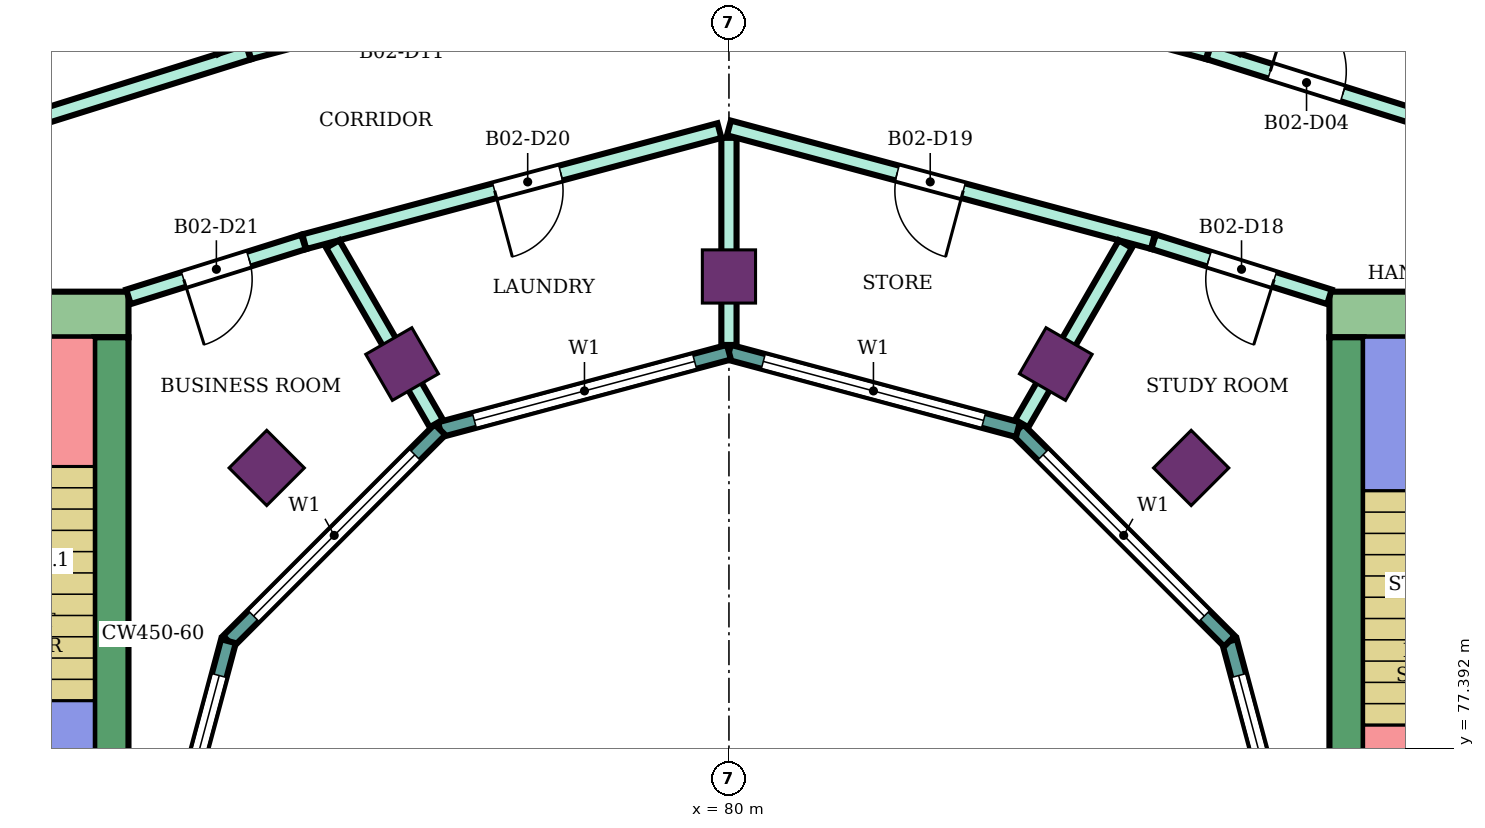
"""IFC4 building model, lengths in metres.
Left out: names, types, materials, properties, quantities, classifications, styles, units other than length and angle.
Written with IfcOpenShell. Run it as: python <this file> out.ifc"""

import sys

from ifc_helpers import new_model, si_unit, direction, frame, frame_2d, origin, origin_2d, place, context, subcontext, project, spatial, rectangle, extrude, element, fill, save


model = new_model("IFC4")
c1 = context("Model", 3, precision=1e-05, world=origin(), true_north=direction((0.0, 1.0)))
c2 = subcontext(c1, "Body", "Model", "MODEL_VIEW")
j1 = project(units=[si_unit("LENGTHUNIT", "METRE"), si_unit("PLANEANGLEUNIT", "RADIAN")], contexts=[c1])
p1 = place(None, origin())
s1 = spatial("IfcSite", under=j1, at=p1, CompositionType="ELEMENT")
p2 = place(p1, origin())
s2 = spatial("IfcBuilding", under=s1, at=p2, CompositionType="ELEMENT")
p3 = place(p2, frame((0.0, 0.0, 220.9)))
s3 = spatial("IfcBuildingStorey", under=s2, at=p3, CompositionType="ELEMENT", Elevation=220.9)
for number, where, z_axis, x_axis in (
    (1, (86.081, 81.081, 0.0), (0.0, 0.0, 1.0), (0.707, 0.707, 0.0)),
    (2, (84.3, 82.448, 0.0), (0.0, 0.0, 1.0), (0.5, 0.866, 0.0)),
    (3, (80.0, 83.6, 0.0), (0.0, 0.0, 1.0), (0.0, 1.0, 0.0)),
    (4, (75.7, 82.448, 0.0), (0.0, 0.0, 1.0), (-0.5, 0.866, 0.0)),
    (5, (73.919, 81.081, 0.0), (0.0, 0.0, 1.0), (-0.707, 0.707, 0.0)),
):
    element("IfcColumn", number, at=place(p3, frame(where, z_axis=z_axis, x_axis=x_axis)), inside=s3, PredefinedType="COLUMN", context=c2, shape_type="SweptSolid", body=[
        extrude(rectangle(XDim=0.7, YDim=0.7, at=origin_2d()), origin(), (0.0, 0.0, 1.0), 4.2),
    ])
p4 = place(p3, frame((87.9, 83.1, 0.0), z_axis=(0.0, 0.0, 1.0), x_axis=(1.0, 0.0, 0.0)))
e6 = element("IfcWall", 6, at=p4, inside=s3, PredefinedType="SHEAR", context=c2, shape_type="SweptSolid", body=[
    extrude(rectangle(XDim=14.9, YDim=0.6, at=frame_2d((7.45, 0.0))), origin(), (0.0, 0.0, 1.0), 3.88),
])
p5 = place(p4, frame((4.2, 0.0, 0.0)))
e7 = element("IfcOpeningElement", 7, at=p5, cuts=e6, PredefinedType="OPENING", context=c2, shape_type="SweptSolid", body=[
    extrude(rectangle(XDim=2.4, YDim=2.4, at=frame_2d((1.2, 1.2))), frame((0.0, 0.31, 0.0), z_axis=(0.0, -1.0, 0.0), x_axis=(1.0, 0.0, 0.0)), (0.0, 0.0, 1.0), 0.62),
])
p6 = place(p3, frame((88.125, 75.0, 0.0), z_axis=(0.0, 0.0, 1.0), x_axis=(0.0, 1.0, 0.0)))
e8 = element("IfcWall", 8, at=p6, inside=s3, PredefinedType="SHEAR", context=c2, shape_type="SweptSolid", body=[
    extrude(rectangle(XDim=7.8, YDim=0.45, at=frame_2d((3.9, 0.0))), origin(), (0.0, 0.0, 1.0), 3.88),
])
p7 = place(p3, frame((72.1, 83.1, 0.0), z_axis=(0.0, 0.0, 1.0), x_axis=(-1.0, 0.0, 0.0)))
e9 = element("IfcWall", 9, at=p7, inside=s3, PredefinedType="SHEAR", context=c2, shape_type="SweptSolid", body=[
    extrude(rectangle(XDim=14.9, YDim=0.6, at=frame_2d((7.45, 0.0))), origin(), (0.0, 0.0, 1.0), 3.88),
])
p8 = place(p7, frame((4.2, 0.0, 0.0)))
e10 = element("IfcOpeningElement", 10, at=p8, cuts=e9, PredefinedType="OPENING", context=c2, shape_type="SweptSolid", body=[
    extrude(rectangle(XDim=2.4, YDim=2.4, at=frame_2d((1.2, 1.2))), frame((0.0, 0.31, 0.0), z_axis=(0.0, -1.0, 0.0), x_axis=(1.0, 0.0, 0.0)), (0.0, 0.0, 1.0), 0.62),
])
p9 = place(p3, frame((71.875, 82.8, 0.0), z_axis=(0.0, 0.0, 1.0), x_axis=(0.0, -1.0, 0.0)))
e11 = element("IfcWall", 11, at=p9, inside=s3, PredefinedType="SHEAR", context=c2, shape_type="SweptSolid", body=[
    extrude(rectangle(XDim=7.8, YDim=0.45, at=frame_2d((3.9, 0.0))), origin(), (0.0, 0.0, 1.0), 3.88),
])
p10 = place(p3, frame((87.604, 75.0, 0.0), z_axis=(0.0, 0.0, 1.0), x_axis=(-0.258789828301, 0.965933654434, 0.0)))
e12 = element("IfcWall", 12, at=p10, inside=s3, PredefinedType="NOTDEFINED", context=c2, shape_type="SweptSolid", body=[
    extrude(rectangle(XDim=3.936, YDim=0.2, at=frame_2d((1.968, 0.0))), origin(), (0.0, 0.0, 1.0), 4.2),
])
p11 = place(p10, frame((0.468, 0.0, 0.9)))
e13 = element("IfcOpeningElement", 13, at=p11, cuts=e12, PredefinedType="OPENING", context=c2, shape_type="SweptSolid", body=[
    extrude(rectangle(XDim=3.0, YDim=2.3, at=frame_2d((1.5, 1.15))), frame((0.0, 0.11, 0.0), z_axis=(0.0, -1.0, 0.0), x_axis=(1.0, 0.0, 0.0)), (0.0, 0.0, 1.0), 0.22),
])
p12 = place(p3, frame((86.585, 78.802, 0.0), z_axis=(0.0, 0.0, 1.0), x_axis=(-0.707106781187, 0.707106781187, 0.0)))
e14 = element("IfcWall", 14, at=p12, inside=s3, PredefinedType="NOTDEFINED", context=c2, shape_type="SweptSolid", body=[
    extrude(rectangle(XDim=3.936, YDim=0.2, at=frame_2d((1.968, 0.0))), origin(), (0.0, 0.0, 1.0), 4.2),
])
p13 = place(p12, frame((0.468, 0.0, 0.9)))
e15 = element("IfcOpeningElement", 15, at=p13, cuts=e14, PredefinedType="OPENING", context=c2, shape_type="SweptSolid", body=[
    extrude(rectangle(XDim=3.0, YDim=2.3, at=frame_2d((1.5, 1.15))), frame((0.0, 0.11, 0.0), z_axis=(0.0, -1.0, 0.0), x_axis=(1.0, 0.0, 0.0)), (0.0, 0.0, 1.0), 0.22),
])
p14 = place(p3, frame((83.802, 81.585, 0.0), z_axis=(0.0, 0.0, 1.0), x_axis=(-0.965933654434, 0.258789828301, 0.0)))
e16 = element("IfcWall", 16, at=p14, inside=s3, PredefinedType="NOTDEFINED", context=c2, shape_type="SweptSolid", body=[
    extrude(rectangle(XDim=3.936, YDim=0.2, at=frame_2d((1.968, 0.0))), origin(), (0.0, 0.0, 1.0), 4.2),
])
p15 = place(p14, frame((0.468, 0.0, 0.9)))
e17 = element("IfcOpeningElement", 17, at=p15, cuts=e16, PredefinedType="OPENING", context=c2, shape_type="SweptSolid", body=[
    extrude(rectangle(XDim=3.0, YDim=2.3, at=frame_2d((1.5, 1.15))), frame((0.0, 0.11, 0.0), z_axis=(0.0, -1.0, 0.0), x_axis=(1.0, 0.0, 0.0)), (0.0, 0.0, 1.0), 0.22),
])
p16 = place(p3, frame((80.0, 82.604, 0.0), z_axis=(0.0, 0.0, 1.0), x_axis=(-0.965933654434, -0.258789828301, 0.0)))
e18 = element("IfcWall", 18, at=p16, inside=s3, PredefinedType="NOTDEFINED", context=c2, shape_type="SweptSolid", body=[
    extrude(rectangle(XDim=3.936, YDim=0.2, at=frame_2d((1.968, 0.0))), origin(), (0.0, 0.0, 1.0), 4.2),
])
p17 = place(p16, frame((0.468, 0.0, 0.9)))
e19 = element("IfcOpeningElement", 19, at=p17, cuts=e18, PredefinedType="OPENING", context=c2, shape_type="SweptSolid", body=[
    extrude(rectangle(XDim=3.0, YDim=2.3, at=frame_2d((1.5, 1.15))), frame((0.0, 0.11, 0.0), z_axis=(0.0, -1.0, 0.0), x_axis=(1.0, 0.0, 0.0)), (0.0, 0.0, 1.0), 0.22),
])
p18 = place(p3, frame((76.198, 81.585, 0.0), z_axis=(0.0, 0.0, 1.0), x_axis=(-0.707106781187, -0.707106781187, 0.0)))
e20 = element("IfcWall", 20, at=p18, inside=s3, PredefinedType="NOTDEFINED", context=c2, shape_type="SweptSolid", body=[
    extrude(rectangle(XDim=3.936, YDim=0.2, at=frame_2d((1.968, 0.0))), origin(), (0.0, 0.0, 1.0), 4.2),
])
p19 = place(p18, frame((0.468, 0.0, 0.9)))
e21 = element("IfcOpeningElement", 21, at=p19, cuts=e20, PredefinedType="OPENING", context=c2, shape_type="SweptSolid", body=[
    extrude(rectangle(XDim=3.0, YDim=2.3, at=frame_2d((1.5, 1.15))), frame((0.0, 0.11, 0.0), z_axis=(0.0, -1.0, 0.0), x_axis=(1.0, 0.0, 0.0)), (0.0, 0.0, 1.0), 0.22),
])
p20 = place(p3, frame((73.415, 78.802, 0.0), z_axis=(0.0, 0.0, 1.0), x_axis=(-0.258789828301, -0.965933654434, 0.0)))
e22 = element("IfcWall", 22, at=p20, inside=s3, PredefinedType="NOTDEFINED", context=c2, shape_type="SweptSolid", body=[
    extrude(rectangle(XDim=3.936, YDim=0.2, at=frame_2d((1.968, 0.0))), origin(), (0.0, 0.0, 1.0), 4.2),
])
p21 = place(p20, frame((0.468, 0.0, 0.9)))
e23 = element("IfcOpeningElement", 23, at=p21, cuts=e22, PredefinedType="OPENING", context=c2, shape_type="SweptSolid", body=[
    extrude(rectangle(XDim=3.0, YDim=2.3, at=frame_2d((1.5, 1.15))), frame((0.0, 0.11, 0.0), z_axis=(0.0, -1.0, 0.0), x_axis=(1.0, 0.0, 0.0)), (0.0, 0.0, 1.0), 0.22),
])
p22 = place(p3, frame((68.2, 84.834, 0.0), z_axis=(0.0, 0.0, 1.0), x_axis=(0.954260265251, 0.298977166624, 0.0)))
e24 = element("IfcWall", 24, at=p22, inside=s3, PredefinedType="PARTITIONING", context=c2, shape_type="SweptSolid", body=[
    extrude(rectangle(XDim=5.741, YDim=0.2, at=frame_2d((2.87, 0.0))), origin(), (0.0, 0.0, 1.0), 3.75),
])
p23 = place(p3, frame((72.1, 83.332, 0.0), z_axis=(0.0, 0.0, 1.0), x_axis=(0.954233106619, 0.299063836383, 0.0)))
e25 = element("IfcWall", 25, at=p23, inside=s3, PredefinedType="PARTITIONING", context=c2, shape_type="SweptSolid", body=[
    extrude(rectangle(XDim=2.414, YDim=0.2, at=frame_2d((1.207, 0.0))), origin(), (0.0, 0.0, 1.0), 3.75),
])
p24 = place(p23, frame((0.762, 0.0, 0.0)))
e26 = element("IfcOpeningElement", 26, at=p24, cuts=e25, PredefinedType="OPENING", context=c2, shape_type="SweptSolid", body=[
    extrude(rectangle(XDim=0.9, YDim=2.1, at=frame_2d((0.45, 1.05))), frame((0.0, 0.11, 0.0), z_axis=(0.0, -1.0, 0.0), x_axis=(1.0, 0.0, 0.0)), (0.0, 0.0, 1.0), 0.22),
])
p25 = place(p3, frame((73.687, 86.554, 0.0), z_axis=(0.0, 0.0, 1.0), x_axis=(0.96595258731, 0.258719150952, 0.0)))
e27 = element("IfcWall", 27, at=p25, inside=s3, PredefinedType="PARTITIONING", context=c2, shape_type="SweptSolid", body=[
    extrude(rectangle(XDim=6.486, YDim=0.2, at=frame_2d((3.243, 0.0))), origin(), (0.0, 0.0, 1.0), 3.75),
])
p26 = place(p25, frame((1.578, 0.0, 0.0)))
e28 = element("IfcOpeningElement", 28, at=p26, cuts=e27, PredefinedType="OPENING", context=c2, shape_type="SweptSolid", body=[
    extrude(rectangle(XDim=1.0, YDim=2.1, at=frame_2d((0.5, 1.05))), frame((0.0, 0.11, 0.0), z_axis=(0.0, -1.0, 0.0), x_axis=(1.0, 0.0, 0.0)), (0.0, 0.0, 1.0), 0.22),
])
p27 = place(p3, frame((74.413, 84.057, 0.0), z_axis=(0.0, 0.0, 1.0), x_axis=(0.965972135939, 0.258646153246, 0.0)))
e29 = element("IfcWall", 29, at=p27, inside=s3, PredefinedType="PARTITIONING", context=c2, shape_type="SweptSolid", body=[
    extrude(rectangle(XDim=5.654, YDim=0.2, at=frame_2d((2.827, 0.0))), origin(), (0.0, 0.0, 1.0), 3.75),
])
p28 = place(p27, frame((2.593, 0.0, 0.0)))
e30 = element("IfcOpeningElement", 30, at=p28, cuts=e29, PredefinedType="OPENING", context=c2, shape_type="SweptSolid", body=[
    extrude(rectangle(XDim=0.9, YDim=2.1, at=frame_2d((0.45, 1.05))), frame((0.0, 0.11, 0.0), z_axis=(0.0, -1.0, 0.0), x_axis=(1.0, 0.0, 0.0)), (0.0, 0.0, 1.0), 0.22),
])
p29 = place(p3, frame((74.787, 84.027, 0.0), z_axis=(0.0, 0.0, 1.0), x_axis=(0.500079107518, -0.86597972622, 0.0)))
e31 = element("IfcWall", 31, at=p29, inside=s3, PredefinedType="PARTITIONING", context=c2, shape_type="SweptSolid", body=[
    extrude(rectangle(XDim=2.726, YDim=0.2, at=frame_2d((1.363, 0.0))), origin(), (0.0, 0.0, 1.0), 3.75),
])
p30 = place(p3, frame((80.0, 82.699, 0.0), z_axis=(0.0, 0.0, 1.0), x_axis=(0.0, 1.0, 0.0)))
e32 = element("IfcWall", 32, at=p30, inside=s3, PredefinedType="PARTITIONING", context=c2, shape_type="SweptSolid", body=[
    extrude(rectangle(XDim=2.725, YDim=0.2, at=frame_2d((1.363, 0.0))), origin(), (0.0, 0.0, 1.0), 3.75),
])
p31 = place(p3, frame((80.0, 85.554, 0.0), z_axis=(0.0, 0.0, 1.0), x_axis=(0.965928989968, -0.258807237802, 0.0)))
e33 = element("IfcWall", 33, at=p31, inside=s3, PredefinedType="PARTITIONING", context=c2, shape_type="SweptSolid", body=[
    extrude(rectangle(XDim=5.774, YDim=0.2, at=frame_2d((2.887, 0.0))), origin(), (0.0, 0.0, 1.0), 3.75),
])
p32 = place(p31, frame((2.292, 0.0, 0.0)))
e34 = element("IfcOpeningElement", 34, at=p32, cuts=e33, PredefinedType="OPENING", context=c2, shape_type="SweptSolid", body=[
    extrude(rectangle(XDim=0.9, YDim=2.1, at=frame_2d((0.45, 1.05))), frame((0.0, 0.11, 0.0), z_axis=(0.0, -1.0, 0.0), x_axis=(1.0, 0.0, 0.0)), (0.0, 0.0, 1.0), 0.22),
])
p33 = place(p3, frame((80.048, 88.233, 0.0), z_axis=(0.0, 0.0, 1.0), x_axis=(0.965865387308, -0.259044501198, 0.0)))
e35 = element("IfcWall", 35, at=p33, inside=s3, PredefinedType="PARTITIONING", context=c2, shape_type="SweptSolid", body=[
    extrude(rectangle(XDim=6.476, YDim=0.2, at=frame_2d((3.238, 0.0))), origin(), (0.0, 0.0, 1.0), 3.75),
])
p34 = place(p33, frame((0.5, 0.0, 0.0)))
e36 = element("IfcOpeningElement", 36, at=p34, cuts=e35, PredefinedType="OPENING", context=c2, shape_type="SweptSolid", body=[
    extrude(rectangle(XDim=1.0, YDim=2.1, at=frame_2d((0.5, 1.05))), frame((0.0, 0.11, 0.0), z_axis=(0.0, -1.0, 0.0), x_axis=(1.0, 0.0, 0.0)), (0.0, 0.0, 1.0), 0.22),
])
p35 = place(p3, frame((83.852, 81.665, 0.0), z_axis=(0.0, 0.0, 1.0), x_axis=(0.500146274735, 0.865940935554, 0.0)))
e37 = element("IfcWall", 37, at=p35, inside=s3, PredefinedType="PARTITIONING", context=c2, shape_type="SweptSolid", body=[
    extrude(rectangle(XDim=2.726, YDim=0.2, at=frame_2d((1.363, 0.0))), origin(), (0.0, 0.0, 1.0), 3.75),
])
p36 = place(p3, frame((85.587, 84.057, 0.0), z_axis=(0.0, 0.0, 1.0), x_axis=(0.954239513179, -0.299043393987, 0.0)))
e38 = element("IfcWall", 38, at=p36, inside=s3, PredefinedType="PARTITIONING", context=c2, shape_type="SweptSolid", body=[
    extrude(rectangle(XDim=2.424, YDim=0.2, at=frame_2d((1.212, 0.0))), origin(), (0.0, 0.0, 1.0), 3.75),
])
p37 = place(p36, frame((0.762, 0.0, 0.0)))
e39 = element("IfcOpeningElement", 39, at=p37, cuts=e38, PredefinedType="OPENING", context=c2, shape_type="SweptSolid", body=[
    extrude(rectangle(XDim=0.9, YDim=2.1, at=frame_2d((0.45, 1.05))), frame((0.0, 0.11, 0.0), z_axis=(0.0, -1.0, 0.0), x_axis=(1.0, 0.0, 0.0)), (0.0, 0.0, 1.0), 0.22),
])
p38 = place(p3, frame((86.313, 86.554, 0.0), z_axis=(0.0, 0.0, 1.0), x_axis=(0.954081217458, -0.299548043717, 0.0)))
e40 = element("IfcWall", 40, at=p38, inside=s3, PredefinedType="PARTITIONING", context=c2, shape_type="SweptSolid", body=[
    extrude(rectangle(XDim=5.721, YDim=0.2, at=frame_2d((2.86, 0.0))), origin(), (0.0, 0.0, 1.0), 3.75),
])
p39 = place(p38, frame((0.848, 0.0, 0.0)))
e41 = element("IfcOpeningElement", 41, at=p39, cuts=e40, PredefinedType="OPENING", context=c2, shape_type="SweptSolid", body=[
    extrude(rectangle(XDim=1.0, YDim=2.1, at=frame_2d((0.5, 1.05))), frame((0.0, 0.11, 0.0), z_axis=(0.0, -1.0, 0.0), x_axis=(1.0, 0.0, 0.0)), (0.0, 0.0, 1.0), 0.22),
])
p40 = place(p3, frame((67.109, 97.346, 0.0), z_axis=(0.0, 0.0, 1.0), x_axis=(0.498583439824, -0.866841711925, 0.0)))
e42 = element("IfcWall", 42, at=p40, inside=s3, PredefinedType="PARTITIONING", context=c2, shape_type="SweptSolid", body=[
    extrude(rectangle(XDim=12.456, YDim=0.1, at=frame_2d((6.228, 0.0))), origin(), (0.0, 0.0, 1.0), 3.75),
])
p41 = place(p40, frame((2.538, 0.0, 0.0)))
e43 = element("IfcOpeningElement", 43, at=p41, cuts=e42, PredefinedType="OPENING", context=c2, shape_type="SweptSolid", body=[
    extrude(rectangle(XDim=0.9, YDim=2.1, at=frame_2d((0.45, 1.05))), frame((0.0, 0.06, 0.0), z_axis=(0.0, -1.0, 0.0), x_axis=(1.0, 0.0, 0.0)), (0.0, 0.0, 1.0), 0.12),
])
p42 = place(p40, frame((9.85, 0.0, 0.0)))
e44 = element("IfcOpeningElement", 44, at=p42, cuts=e42, PredefinedType="OPENING", context=c2, shape_type="SweptSolid", body=[
    extrude(rectangle(XDim=0.8, YDim=2.1, at=frame_2d((0.4, 1.05))), frame((0.0, 0.06, 0.0), z_axis=(0.0, -1.0, 0.0), x_axis=(1.0, 0.0, 0.0)), (0.0, 0.0, 1.0), 0.12),
])
p43 = place(p3, frame((86.671, 86.554, 0.0), z_axis=(0.0, 0.0, 1.0), x_axis=(0.500104188531, 0.865965242151, 0.0)))
e45 = element("IfcWall", 45, at=p43, inside=s3, PredefinedType="PARTITIONING", context=c2, shape_type="SweptSolid", body=[
    extrude(rectangle(XDim=12.456, YDim=0.1, at=frame_2d((6.228, 0.0))), origin(), (0.0, 0.0, 1.0), 3.75),
])
p44 = place(p43, frame((9.111, 0.0, 0.0)))
e46 = element("IfcOpeningElement", 46, at=p44, cuts=e45, PredefinedType="OPENING", context=c2, shape_type="SweptSolid", body=[
    extrude(rectangle(XDim=0.9, YDim=2.1, at=frame_2d((0.45, 1.05))), frame((0.0, 0.06, 0.0), z_axis=(0.0, -1.0, 0.0), x_axis=(1.0, 0.0, 0.0)), (0.0, 0.0, 1.0), 0.12),
])
p45 = place(p43, frame((2.462, 0.0, 0.0)))
e47 = element("IfcOpeningElement", 47, at=p45, cuts=e45, PredefinedType="OPENING", context=c2, shape_type="SweptSolid", body=[
    extrude(rectangle(XDim=0.8, YDim=2.1, at=frame_2d((0.4, 1.05))), frame((0.0, 0.06, 0.0), z_axis=(0.0, -1.0, 0.0), x_axis=(1.0, 0.0, 0.0)), (0.0, 0.0, 1.0), 0.12),
])
p46 = place(p11, origin())
e48 = element("IfcWindow", 48, at=p46, inside=s3, PartitioningType="SINGLE_PANEL", PredefinedType="WINDOW", context=c2, shape_type="SweptSolid", body=[
    extrude(rectangle(XDim=3.0, YDim=2.3, at=frame_2d((1.5, 1.15))), frame((0.0, 0.03, 0.0), z_axis=(0.0, -1.0, 0.0), x_axis=(1.0, 0.0, 0.0)), (0.0, 0.0, 1.0), 0.06),
])
fill(e13, e48)
p47 = place(p13, origin())
e49 = element("IfcWindow", 49, at=p47, inside=s3, PartitioningType="SINGLE_PANEL", PredefinedType="WINDOW", context=c2, shape_type="SweptSolid", body=[
    extrude(rectangle(XDim=3.0, YDim=2.3, at=frame_2d((1.5, 1.15))), frame((0.0, 0.03, 0.0), z_axis=(0.0, -1.0, 0.0), x_axis=(1.0, 0.0, 0.0)), (0.0, 0.0, 1.0), 0.06),
])
fill(e15, e49)
p48 = place(p15, origin())
e50 = element("IfcWindow", 50, at=p48, inside=s3, PartitioningType="SINGLE_PANEL", PredefinedType="WINDOW", context=c2, shape_type="SweptSolid", body=[
    extrude(rectangle(XDim=3.0, YDim=2.3, at=frame_2d((1.5, 1.15))), frame((0.0, 0.03, 0.0), z_axis=(0.0, -1.0, 0.0), x_axis=(1.0, 0.0, 0.0)), (0.0, 0.0, 1.0), 0.06),
])
fill(e17, e50)
p49 = place(p17, origin())
e51 = element("IfcWindow", 51, at=p49, inside=s3, PartitioningType="SINGLE_PANEL", PredefinedType="WINDOW", context=c2, shape_type="SweptSolid", body=[
    extrude(rectangle(XDim=3.0, YDim=2.3, at=frame_2d((1.5, 1.15))), frame((0.0, 0.03, 0.0), z_axis=(0.0, -1.0, 0.0), x_axis=(1.0, 0.0, 0.0)), (0.0, 0.0, 1.0), 0.06),
])
fill(e19, e51)
p50 = place(p19, origin())
e52 = element("IfcWindow", 52, at=p50, inside=s3, PartitioningType="SINGLE_PANEL", PredefinedType="WINDOW", context=c2, shape_type="SweptSolid", body=[
    extrude(rectangle(XDim=3.0, YDim=2.3, at=frame_2d((1.5, 1.15))), frame((0.0, 0.03, 0.0), z_axis=(0.0, -1.0, 0.0), x_axis=(1.0, 0.0, 0.0)), (0.0, 0.0, 1.0), 0.06),
])
fill(e21, e52)
p51 = place(p21, origin())
e53 = element("IfcWindow", 53, at=p51, inside=s3, PartitioningType="SINGLE_PANEL", PredefinedType="WINDOW", context=c2, shape_type="SweptSolid", body=[
    extrude(rectangle(XDim=3.0, YDim=2.3, at=frame_2d((1.5, 1.15))), frame((0.0, 0.03, 0.0), z_axis=(0.0, -1.0, 0.0), x_axis=(1.0, 0.0, 0.0)), (0.0, 0.0, 1.0), 0.06),
])
fill(e23, e53)
p52 = place(p39, origin())
e54 = element("IfcDoor", 54, at=p52, inside=s3, OperationType="SINGLE_SWING_LEFT", PredefinedType="DOOR", context=c2, shape_type="SweptSolid", body=[
    extrude(rectangle(XDim=1.0, YDim=2.1, at=frame_2d((0.5, 1.05))), frame((0.0, 0.025, 0.0), z_axis=(0.0, -1.0, 0.0), x_axis=(1.0, 0.0, 0.0)), (0.0, 0.0, 1.0), 0.05),
])
fill(e41, e54)
p53 = place(p37, frame((0.9, 0.0, 0.0), z_axis=(0.0, 0.0, 1.0), x_axis=(-1.0, 0.0, 0.0)))
e55 = element("IfcDoor", 55, at=p53, inside=s3, OperationType="SINGLE_SWING_LEFT", PredefinedType="DOOR", context=c2, shape_type="SweptSolid", body=[
    extrude(rectangle(XDim=0.9, YDim=2.1, at=frame_2d((0.45, 1.05))), frame((0.0, 0.025, 0.0), z_axis=(0.0, -1.0, 0.0), x_axis=(1.0, 0.0, 0.0)), (0.0, 0.0, 1.0), 0.05),
])
fill(e39, e55)
p54 = place(p32, frame((0.9, 0.0, 0.0), z_axis=(0.0, 0.0, 1.0), x_axis=(-1.0, 0.0, 0.0)))
e56 = element("IfcDoor", 56, at=p54, inside=s3, OperationType="SINGLE_SWING_LEFT", PredefinedType="DOOR", context=c2, shape_type="SweptSolid", body=[
    extrude(rectangle(XDim=0.9, YDim=2.1, at=frame_2d((0.45, 1.05))), frame((0.0, 0.025, 0.0), z_axis=(0.0, -1.0, 0.0), x_axis=(1.0, 0.0, 0.0)), (0.0, 0.0, 1.0), 0.05),
])
fill(e34, e56)
p55 = place(p28, frame((0.9, 0.0, 0.0), z_axis=(0.0, 0.0, 1.0), x_axis=(-1.0, 0.0, 0.0)))
e57 = element("IfcDoor", 57, at=p55, inside=s3, OperationType="SINGLE_SWING_RIGHT", PredefinedType="DOOR", context=c2, shape_type="SweptSolid", body=[
    extrude(rectangle(XDim=0.9, YDim=2.1, at=frame_2d((0.45, 1.05))), frame((0.0, 0.025, 0.0), z_axis=(0.0, -1.0, 0.0), x_axis=(1.0, 0.0, 0.0)), (0.0, 0.0, 1.0), 0.05),
])
fill(e30, e57)
p56 = place(p24, frame((0.9, 0.0, 0.0), z_axis=(0.0, 0.0, 1.0), x_axis=(-1.0, 0.0, 0.0)))
e58 = element("IfcDoor", 58, at=p56, inside=s3, OperationType="SINGLE_SWING_RIGHT", PredefinedType="DOOR", context=c2, shape_type="SweptSolid", body=[
    extrude(rectangle(XDim=0.9, YDim=2.1, at=frame_2d((0.45, 1.05))), frame((0.0, 0.025, 0.0), z_axis=(0.0, -1.0, 0.0), x_axis=(1.0, 0.0, 0.0)), (0.0, 0.0, 1.0), 0.05),
])
fill(e26, e58)
save(model, sys.argv[1])
